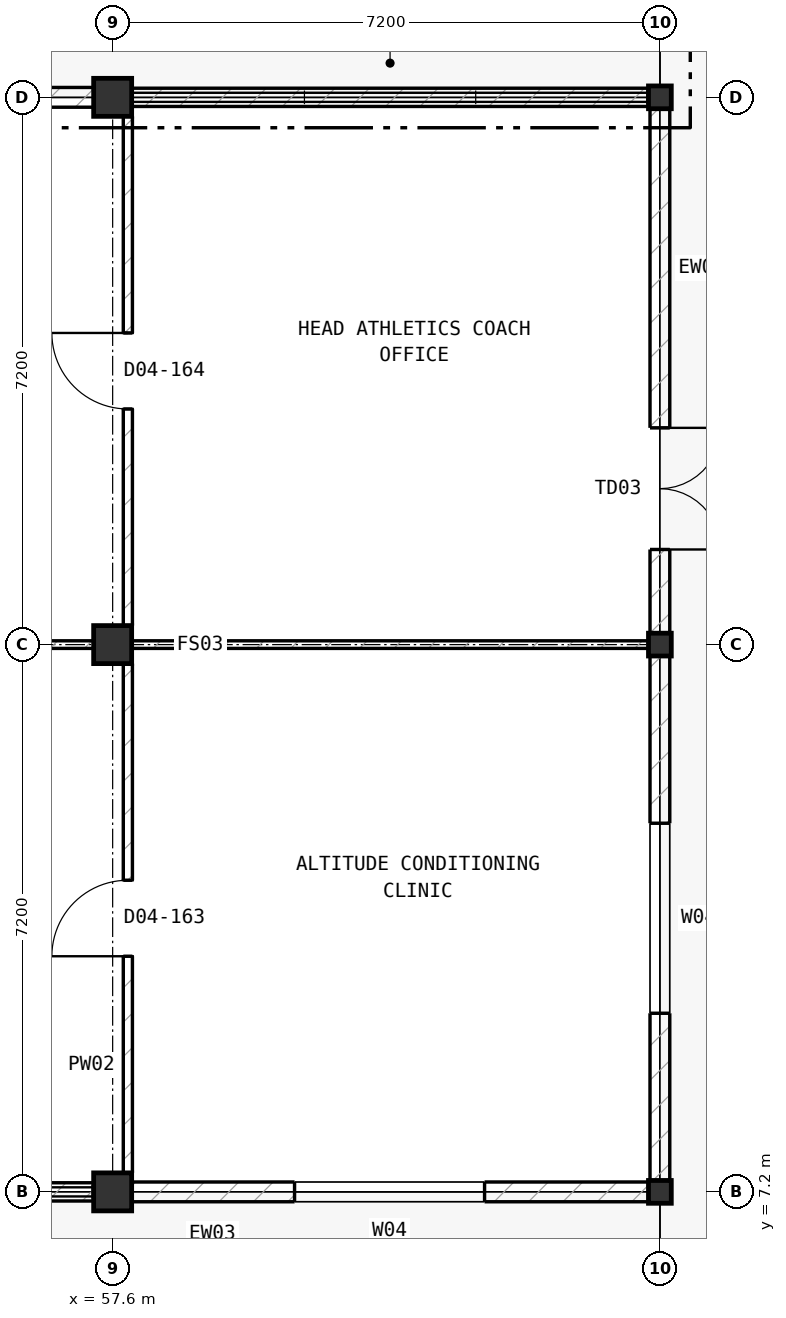
"""IFC4 building model, lengths in metres.
Left out: names, types, materials, properties, quantities, classifications, styles, units other than length and angle.
Written with IfcOpenShell. Run it as: python <this file> out.ifc"""

import sys

from ifc_helpers import new_model, si_unit, direction, frame, frame_2d, origin, origin_2d, place, context, subcontext, project, spatial, rectangle, hollow_rectangle, extrude, element, fill, save


model = new_model("IFC4")
c1 = context("Model", 3, precision=1e-05, world=origin(), true_north=direction((0.0, 1.0)))
c2 = subcontext(c1, "Body", "Model", "MODEL_VIEW")
j1 = project(units=[si_unit("LENGTHUNIT", "METRE"), si_unit("PLANEANGLEUNIT", "RADIAN")], contexts=[c1])
p1 = place(None, origin())
s1 = spatial("IfcSite", under=j1, at=p1, CompositionType="ELEMENT")
p2 = place(p1, origin())
s2 = spatial("IfcBuilding", under=s1, at=p2, CompositionType="ELEMENT")
p3 = place(p2, frame((0.0, 0.0, 20.4)))
s3 = spatial("IfcBuildingStorey", under=s2, at=p3, CompositionType="ELEMENT", Elevation=20.4)
for number, where, z_axis, x_axis in (
    (1, (57.6, 7.2, 0.0), (0.0, 0.0, 1.0), (1.0, 0.0, 0.0)),
    (2, (57.6, 14.4, 0.0), (0.0, 0.0, 1.0), (1.0, 0.0, 0.0)),
    (3, (57.6, 21.6, 0.0), (0.0, 0.0, 1.0), (1.0, 0.0, 0.0)),
):
    element("IfcColumn", number, at=place(p3, frame(where, z_axis=z_axis, x_axis=x_axis)), inside=s3, PredefinedType="COLUMN", context=c2, shape_type="SweptSolid", body=[
        extrude(rectangle(XDim=0.5, YDim=0.5, at=origin_2d()), origin(), (0.0, 0.0, 1.0), 4.4),
    ])
for number, where, z_axis, x_axis in (
    (4, (64.8, 7.2, 0.0), (0.0, 0.0, 1.0), (1.0, 0.0, 0.0)),
    (5, (64.8, 14.4, 0.0), (0.0, 0.0, 1.0), (1.0, 0.0, 0.0)),
    (6, (64.8, 21.6, 0.0), (0.0, 0.0, 1.0), (1.0, 0.0, 0.0)),
):
    element("IfcColumn", number, at=place(p3, frame(where, z_axis=z_axis, x_axis=x_axis)), inside=s3, PredefinedType="COLUMN", context=c2, shape_type="SweptSolid", body=[
        extrude(hollow_rectangle(XDim=0.3, YDim=0.3, WallThickness=0.012, at=origin_2d()), origin(), (0.0, 0.0, 1.0), 4.17),
    ])
p4 = place(p3, frame((50.635, 21.6, 0.0), z_axis=(0.0, 0.0, 1.0), x_axis=(1.0, 0.0, 0.0)))
e7 = element("IfcWall", 7, at=p4, inside=s3, PredefinedType="SOLIDWALL", context=c2, shape_type="SweptSolid", body=[
    extrude(rectangle(XDim=6.73, YDim=0.26, at=frame_2d((3.365, 0.0))), origin(), (0.0, 0.0, 1.0), 3.655),
])
p5 = place(p4, frame((2.465, 0.0, 0.0)))
e8 = element("IfcOpeningElement", 8, at=p5, cuts=e7, PredefinedType="OPENING", context=c2, shape_type="SweptSolid", body=[
    extrude(rectangle(XDim=1.8, YDim=2.3, at=frame_2d((0.9, 1.15))), frame((0.0, 0.14, 0.0), z_axis=(0.0, -1.0, 0.0), x_axis=(1.0, 0.0, 0.0)), (0.0, 0.0, 1.0), 0.28),
])
p6 = place(p3, frame((57.835, 21.6, 0.0), z_axis=(0.0, 0.0, 1.0), x_axis=(1.0, 0.0, 0.0)))
e9 = element("IfcWall", 9, at=p6, inside=s3, PredefinedType="SOLIDWALL", context=c2, shape_type="SweptSolid", body=[
    extrude(rectangle(XDim=6.817, YDim=0.24, at=frame_2d((3.408, 0.0))), origin(), (0.0, 0.0, 1.0), 0.3),
])
p7 = place(p3, frame((64.652, 7.2, 0.0), z_axis=(0.0, 0.0, 1.0), x_axis=(-1.0, 0.0, 0.0)))
e10 = element("IfcWall", 10, at=p7, inside=s3, PredefinedType="SOLIDWALL", context=c2, shape_type="SweptSolid", body=[
    extrude(rectangle(XDim=6.817, YDim=0.26, at=frame_2d((3.408, 0.0))), origin(), (0.0, 0.0, 1.0), 3.655),
])
p8 = place(p7, frame((2.158, 0.0, 0.85)))
e11 = element("IfcOpeningElement", 11, at=p8, cuts=e10, PredefinedType="OPENING", context=c2, shape_type="SweptSolid", body=[
    extrude(rectangle(XDim=2.5, YDim=2.2, at=frame_2d((1.25, 1.1))), frame((0.0, 0.14, 0.0), z_axis=(0.0, -1.0, 0.0), x_axis=(1.0, 0.0, 0.0)), (0.0, 0.0, 1.0), 0.28),
])
p9 = place(p3, frame((57.365, 7.2, 0.0), z_axis=(0.0, 0.0, 1.0), x_axis=(-1.0, 0.0, 0.0)))
e12 = element("IfcWall", 12, at=p9, inside=s3, PredefinedType="SOLIDWALL", context=c2, shape_type="SweptSolid", body=[
    extrude(rectangle(XDim=6.73, YDim=0.24, at=frame_2d((3.365, 0.0))), origin(), (0.0, 0.0, 1.0), 0.3),
])
p10 = place(p3, frame((64.8, 21.451, 0.0), z_axis=(0.0, 0.0, 1.0), x_axis=(0.0, -1.0, 0.0)))
e13 = element("IfcWall", 13, at=p10, inside=s3, PredefinedType="SOLIDWALL", context=c2, shape_type="SweptSolid", body=[
    extrude(rectangle(XDim=6.903, YDim=0.26, at=frame_2d((3.451, 0.0))), origin(), (0.0, 0.0, 1.0), 3.655),
])
p11 = place(p10, frame((4.2, 0.0, 0.0)))
e14 = element("IfcOpeningElement", 14, at=p11, cuts=e13, PredefinedType="OPENING", context=c2, shape_type="SweptSolid", body=[
    extrude(rectangle(XDim=1.6, YDim=2.3, at=frame_2d((0.8, 1.15))), frame((0.0, 0.14, 0.0), z_axis=(0.0, -1.0, 0.0), x_axis=(1.0, 0.0, 0.0)), (0.0, 0.0, 1.0), 0.28),
])
p12 = place(p3, frame((64.8, 14.251, 0.0), z_axis=(0.0, 0.0, 1.0), x_axis=(0.0, -1.0, 0.0)))
e15 = element("IfcWall", 15, at=p12, inside=s3, PredefinedType="SOLIDWALL", context=c2, shape_type="SweptSolid", body=[
    extrude(rectangle(XDim=6.903, YDim=0.26, at=frame_2d((3.452, 0.0))), origin(), (0.0, 0.0, 1.0), 3.655),
])
p13 = place(p12, frame((2.201, 0.0, 0.85)))
e16 = element("IfcOpeningElement", 16, at=p13, cuts=e15, PredefinedType="OPENING", context=c2, shape_type="SweptSolid", body=[
    extrude(rectangle(XDim=2.5, YDim=2.2, at=frame_2d((1.25, 1.1))), frame((0.0, 0.14, 0.0), z_axis=(0.0, -1.0, 0.0), x_axis=(1.0, 0.0, 0.0)), (0.0, 0.0, 1.0), 0.28),
])
p14 = place(p3, frame((57.8, 7.45, 0.0), z_axis=(0.0, 0.0, 1.0), x_axis=(0.0, 1.0, 0.0)))
e17 = element("IfcWall", 17, at=p14, inside=s3, PredefinedType="PARTITIONING", context=c2, shape_type="SweptSolid", body=[
    extrude(rectangle(XDim=6.7, YDim=0.12, at=frame_2d((3.35, 0.0))), origin(), (0.0, 0.0, 1.0), 4.12),
])
p15 = place(p14, frame((2.85, 0.0, 0.0)))
e18 = element("IfcOpeningElement", 18, at=p15, cuts=e17, PredefinedType="OPENING", context=c2, shape_type="SweptSolid", body=[
    extrude(rectangle(XDim=1.0, YDim=2.1, at=frame_2d((0.5, 1.05))), frame((0.0, 0.07, 0.0), z_axis=(0.0, -1.0, 0.0), x_axis=(1.0, 0.0, 0.0)), (0.0, 0.0, 1.0), 0.14),
])
p16 = place(p3, frame((57.8, 14.65, 0.0), z_axis=(0.0, 0.0, 1.0), x_axis=(0.0, 1.0, 0.0)))
e19 = element("IfcWall", 19, at=p16, inside=s3, PredefinedType="PARTITIONING", context=c2, shape_type="SweptSolid", body=[
    extrude(rectangle(XDim=6.7, YDim=0.12, at=frame_2d((3.35, 0.0))), origin(), (0.0, 0.0, 1.0), 4.12),
])
p17 = place(p16, frame((2.85, 0.0, 0.0)))
e20 = element("IfcOpeningElement", 20, at=p17, cuts=e19, PredefinedType="OPENING", context=c2, shape_type="SweptSolid", body=[
    extrude(rectangle(XDim=1.0, YDim=2.1, at=frame_2d((0.5, 1.05))), frame((0.0, 0.07, 0.0), z_axis=(0.0, -1.0, 0.0), x_axis=(1.0, 0.0, 0.0)), (0.0, 0.0, 1.0), 0.14),
])
p18 = place(p3, frame((50.65, 14.4, 0.0), z_axis=(0.0, 0.0, 1.0), x_axis=(1.0, 0.0, 0.0)))
e21 = element("IfcWall", 21, at=p18, inside=s3, PredefinedType="PARTITIONING", context=c2, shape_type="SweptSolid", body=[
    extrude(rectangle(XDim=6.7, YDim=0.1, at=frame_2d((3.35, 0.0))), origin(), (0.0, 0.0, 1.0), 3.6),
])
p19 = place(p18, frame((2.875, 0.0, 0.0)))
e22 = element("IfcOpeningElement", 22, at=p19, cuts=e21, PredefinedType="OPENING", context=c2, shape_type="SweptSolid", body=[
    extrude(rectangle(XDim=0.95, YDim=2.1, at=frame_2d((0.475, 1.05))), frame((0.0, 0.06, 0.0), z_axis=(0.0, -1.0, 0.0), x_axis=(1.0, 0.0, 0.0)), (0.0, 0.0, 1.0), 0.12),
])
p20 = place(p3, frame((57.85, 14.4, 0.0), z_axis=(0.0, 0.0, 1.0), x_axis=(1.0, 0.0, 0.0)))
e23 = element("IfcWall", 23, at=p20, inside=s3, PredefinedType="PARTITIONING", context=c2, shape_type="SweptSolid", body=[
    extrude(rectangle(XDim=6.8, YDim=0.1, at=frame_2d((3.4, 0.0))), origin(), (0.0, 0.0, 1.0), 3.6),
])
p21 = place(p8, origin())
e24 = element("IfcWindow", 24, at=p21, inside=s3, PartitioningType="SINGLE_PANEL", PredefinedType="WINDOW", context=c2, shape_type="SweptSolid", body=[
    extrude(rectangle(XDim=2.5, YDim=2.2, at=frame_2d((1.25, 1.1))), frame((0.0, 0.03, 0.0), z_axis=(0.0, -1.0, 0.0), x_axis=(1.0, 0.0, 0.0)), (0.0, 0.0, 1.0), 0.06),
])
fill(e11, e24)
p22 = place(p11, origin())
e25 = element("IfcDoor", 25, at=p22, inside=s3, OperationType="DOUBLE_DOOR_SINGLE_SWING", PredefinedType="DOOR", context=c2, shape_type="SweptSolid", body=[
    extrude(rectangle(XDim=1.6, YDim=2.3, at=frame_2d((0.8, 1.15))), frame((0.0, 0.025, 0.0), z_axis=(0.0, -1.0, 0.0), x_axis=(1.0, 0.0, 0.0)), (0.0, 0.0, 1.0), 0.05),
])
fill(e14, e25)
p23 = place(p13, origin())
e26 = element("IfcWindow", 26, at=p23, inside=s3, PartitioningType="SINGLE_PANEL", PredefinedType="WINDOW", context=c2, shape_type="SweptSolid", body=[
    extrude(rectangle(XDim=2.5, YDim=2.2, at=frame_2d((1.25, 1.1))), frame((0.0, 0.03, 0.0), z_axis=(0.0, -1.0, 0.0), x_axis=(1.0, 0.0, 0.0)), (0.0, 0.0, 1.0), 0.06),
])
fill(e16, e26)
p24 = place(p15, origin())
e27 = element("IfcDoor", 27, at=p24, inside=s3, OperationType="SINGLE_SWING_LEFT", PredefinedType="DOOR", context=c2, shape_type="SweptSolid", body=[
    extrude(rectangle(XDim=1.0, YDim=2.1, at=frame_2d((0.5, 1.05))), frame((0.0, 0.025, 0.0), z_axis=(0.0, -1.0, 0.0), x_axis=(1.0, 0.0, 0.0)), (0.0, 0.0, 1.0), 0.05),
])
fill(e18, e27)
p25 = place(p17, origin())
e28 = element("IfcDoor", 28, at=p25, inside=s3, OperationType="SINGLE_SWING_RIGHT", PredefinedType="DOOR", context=c2, shape_type="SweptSolid", body=[
    extrude(rectangle(XDim=1.0, YDim=2.1, at=frame_2d((0.5, 1.05))), frame((0.0, 0.025, 0.0), z_axis=(0.0, -1.0, 0.0), x_axis=(1.0, 0.0, 0.0)), (0.0, 0.0, 1.0), 0.05),
])
fill(e20, e28)
save(model, sys.argv[1])
